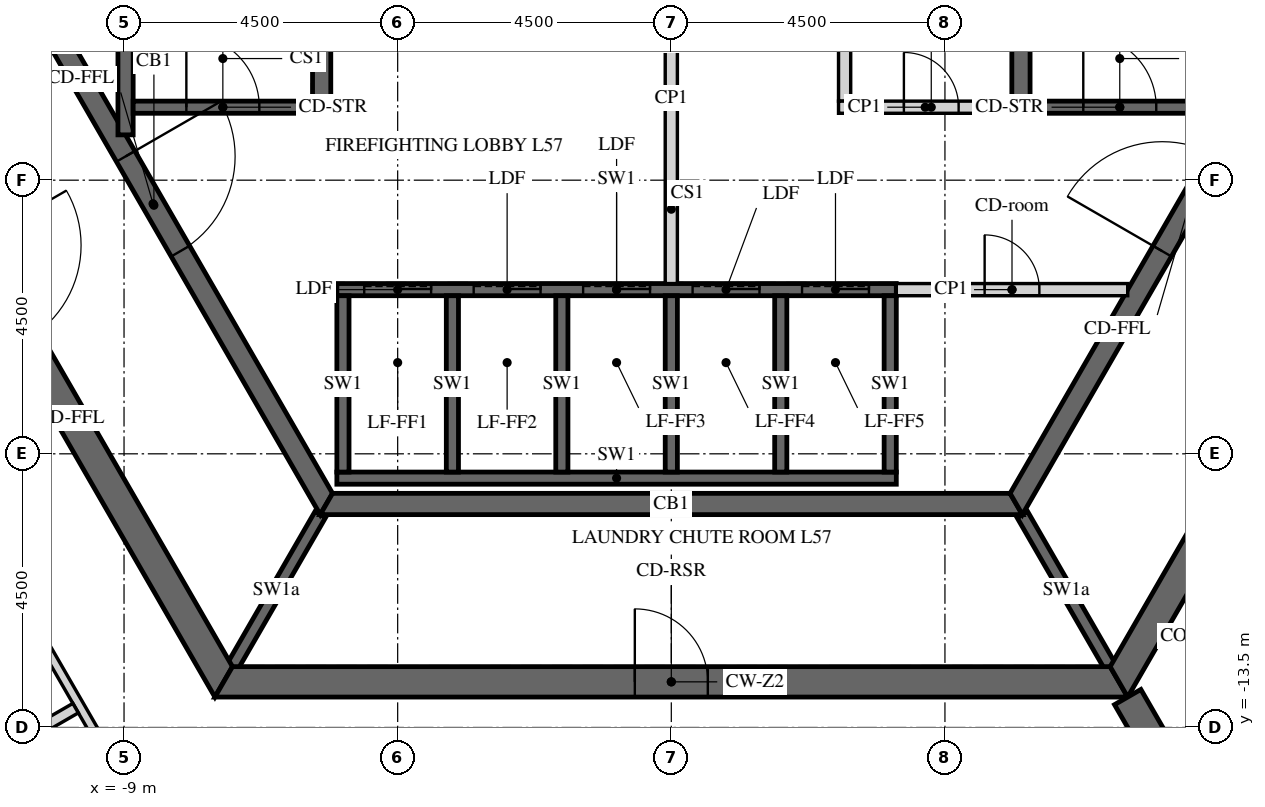
"""IFC4 building model, lengths in metres.
Left out: names, types, materials, properties, quantities, classifications, styles, units other than length and angle.
Written with IfcOpenShell. Run it as: python <this file> out.ifc"""

import sys

from ifc_helpers import new_model, si_unit, direction, frame, frame_2d, origin, place, context, subcontext, project, spatial, polyline, rectangle, outline, extrude, element, fill, save


model = new_model("IFC4")
c1 = context("Model", 3, precision=1e-05, world=origin(), true_north=direction((0.0, 1.0)))
c2 = subcontext(c1, "Body", "Model", "MODEL_VIEW")
j1 = project(units=[si_unit("LENGTHUNIT", "METRE"), si_unit("PLANEANGLEUNIT", "RADIAN")], contexts=[c1])
p1 = place(None, origin())
s1 = spatial("IfcSite", under=j1, at=p1, CompositionType="ELEMENT")
p2 = place(p1, origin())
s2 = spatial("IfcBuilding", under=s1, at=p2, CompositionType="ELEMENT")
p3 = place(p2, frame((0.0, 0.0, 238.5)))
s3 = spatial("IfcBuildingStorey", under=s2, at=p3, CompositionType="ELEMENT", Elevation=238.5)
p4 = place(p3, frame((-14.722, 0.0, -0.15), z_axis=(0.0, 0.0, 1.0), x_axis=(0.50000571537, -0.866022103989, 0.0)))
e1 = element("IfcWall", 1, at=p4, inside=s3, PredefinedType="SHEAR", context=c2, shape_type="SweptSolid", body=[
    extrude(outline(polyline([(-0.144, -0.25), (14.867, -0.25), (14.578, 0.25), (0.144, 0.25), (-0.144, -0.25)])), origin(), (0.0, 0.0, 1.0), 3.9),
])
p5 = place(p4, frame((6.432, 0.0, 0.15)))
e2 = element("IfcOpeningElement", 2, at=p5, cuts=e1, PredefinedType="OPENING", context=c2, shape_type="SweptSolid", body=[
    extrude(rectangle(XDim=1.8, YDim=2.4, at=frame_2d((0.9, 1.2))), frame((0.0, 0.26, 0.0), z_axis=(0.0, -1.0, 0.0), x_axis=(1.0, 0.0, 0.0)), (0.0, 0.0, 1.0), 0.52),
])
p6 = place(p3, frame((-7.361, -12.75, -0.15), z_axis=(0.0, 0.0, 1.0), x_axis=(1.0, 0.0, 0.0)))
e3 = element("IfcWall", 3, at=p6, inside=s3, PredefinedType="SHEAR", context=c2, shape_type="SweptSolid", body=[
    extrude(outline(polyline([(-0.144, -0.25), (14.866, -0.25), (14.578, 0.25), (0.144, 0.25), (-0.144, -0.25)])), origin(), (0.0, 0.0, 1.0), 3.9),
])
p7 = place(p6, frame((6.761, 0.0, 0.15)))
e4 = element("IfcOpeningElement", 4, at=p7, cuts=e3, PredefinedType="OPENING", context=c2, shape_type="SweptSolid", body=[
    extrude(rectangle(XDim=1.2, YDim=2.4, at=frame_2d((0.6, 1.2))), frame((0.0, 0.26, 0.0), z_axis=(0.0, -1.0, 0.0), x_axis=(1.0, 0.0, 0.0)), (0.0, 0.0, 1.0), 0.52),
])
p8 = place(p3, frame((7.361, -12.75, -0.15), z_axis=(0.0, 0.0, 1.0), x_axis=(0.50000571537, 0.866022103989, 0.0)))
e5 = element("IfcWall", 5, at=p8, inside=s3, PredefinedType="SHEAR", context=c2, shape_type="SweptSolid", body=[
    extrude(outline(polyline([(-0.144, -0.25), (14.867, -0.25), (14.578, 0.25), (0.144, 0.25), (-0.144, -0.25)])), origin(), (0.0, 0.0, 1.0), 3.9),
])
p9 = place(p8, frame((6.49, 0.0, 0.15)))
e6 = element("IfcOpeningElement", 6, at=p9, cuts=e5, PredefinedType="OPENING", context=c2, shape_type="SweptSolid", body=[
    extrude(rectangle(XDim=1.8, YDim=2.4, at=frame_2d((0.9, 1.2))), frame((0.0, 0.26, 0.0), z_axis=(0.0, -1.0, 0.0), x_axis=(1.0, 0.0, 0.0)), (0.0, 0.0, 1.0), 0.52),
])
p10 = place(p3, frame((7.506, -13.0, -0.15), z_axis=(0.0, 0.0, 1.0), x_axis=(0.499988271576, -0.866032175087, 0.0)))
e7 = element("IfcWall", 7, at=p10, inside=s3, PredefinedType="SHEAR", context=c2, shape_type="SweptSolid", body=[
    extrude(rectangle(XDim=15.424, YDim=0.5, at=frame_2d((7.712, 0.0))), origin(), (0.0, 0.0, 1.0), 3.9),
])
p11 = place(p10, frame((6.812, 0.0, 0.15)))
e8 = element("IfcOpeningElement", 8, at=p11, cuts=e7, PredefinedType="OPENING", context=c2, shape_type="SweptSolid", body=[
    extrude(rectangle(XDim=1.8, YDim=2.4, at=frame_2d((0.9, 1.2))), frame((0.0, 0.26, 0.0), z_axis=(0.0, -1.0, 0.0), x_axis=(1.0, 0.0, 0.0)), (0.0, 0.0, 1.0), 0.52),
])
p12 = place(p3, frame((-11.345, 0.0, -0.15), z_axis=(0.0, 0.0, 1.0), x_axis=(0.499995046907, -0.866028263435, 0.0)))
e9 = element("IfcWall", 9, at=p12, inside=s3, PredefinedType="SHEAR", context=c2, shape_type="SweptSolid", body=[
    extrude(outline(polyline([(-0.101, -0.175), (11.446, -0.175), (11.244, 0.175), (0.101, 0.175), (-0.101, -0.175)])), origin(), (0.0, 0.0, 1.0), 3.9),
])
p13 = place(p12, frame((4.744, 0.0, 0.15)))
e10 = element("IfcOpeningElement", 10, at=p13, cuts=e9, PredefinedType="OPENING", context=c2, shape_type="SweptSolid", body=[
    extrude(rectangle(XDim=1.8, YDim=2.4, at=frame_2d((0.9, 1.2))), frame((0.0, 0.185, 0.0), z_axis=(0.0, -1.0, 0.0), x_axis=(1.0, 0.0, 0.0)), (0.0, 0.0, 1.0), 0.37),
])
p14 = place(p3, frame((-5.673, -9.825, -0.15), z_axis=(0.0, 0.0, 1.0), x_axis=(1.0, 0.0, 0.0)))
e11 = element("IfcWall", 11, at=p14, inside=s3, PredefinedType="SHEAR", context=c2, shape_type="SweptSolid", body=[
    extrude(outline(polyline([(-0.101, -0.175), (11.446, -0.175), (11.244, 0.175), (0.101, 0.175), (-0.101, -0.175)])), origin(), (0.0, 0.0, 1.0), 3.9),
])
p15 = place(p3, frame((5.673, -9.825, -0.15), z_axis=(0.0, 0.0, 1.0), x_axis=(0.499995046907, 0.866028263435, 0.0)))
e12 = element("IfcWall", 12, at=p15, inside=s3, PredefinedType="SHEAR", context=c2, shape_type="SweptSolid", body=[
    extrude(outline(polyline([(-0.101, -0.175), (11.446, -0.175), (11.244, 0.175), (0.101, 0.175), (-0.101, -0.175)])), origin(), (0.0, 0.0, 1.0), 3.9),
])
p16 = place(p15, frame((4.801, 0.0, 0.15)))
e13 = element("IfcOpeningElement", 13, at=p16, cuts=e12, PredefinedType="OPENING", context=c2, shape_type="SweptSolid", body=[
    extrude(rectangle(XDim=1.8, YDim=2.4, at=frame_2d((0.9, 1.2))), frame((0.0, 0.185, 0.0), z_axis=(0.0, -1.0, 0.0), x_axis=(1.0, 0.0, 0.0)), (0.0, 0.0, 1.0), 0.37),
])
p17 = place(p3, frame((-5.5, -6.3, -0.25), z_axis=(0.0, 0.0, 1.0), x_axis=(1.0, 0.0, 0.0)))
e14 = element("IfcWall", 14, at=p17, inside=s3, PredefinedType="SHEAR", context=c2, shape_type="SweptSolid", body=[
    extrude(rectangle(XDim=9.2, YDim=0.2, at=frame_2d((4.6, 0.0))), origin(), (0.0, 0.0, 1.0), 3.9),
])
p18 = place(p17, frame((0.45, 0.0, 0.25)))
e15 = element("IfcOpeningElement", 15, at=p18, cuts=e14, PredefinedType="OPENING", context=c2, shape_type="SweptSolid", body=[
    extrude(rectangle(XDim=1.1, YDim=2.1, at=frame_2d((0.55, 1.05))), frame((0.0, 0.11, 0.0), z_axis=(0.0, -1.0, 0.0), x_axis=(1.0, 0.0, 0.0)), (0.0, 0.0, 1.0), 0.22),
])
p19 = place(p17, frame((2.25, 0.0, 0.25)))
e16 = element("IfcOpeningElement", 16, at=p19, cuts=e14, PredefinedType="OPENING", context=c2, shape_type="SweptSolid", body=[
    extrude(rectangle(XDim=1.1, YDim=2.1, at=frame_2d((0.55, 1.05))), frame((0.0, 0.11, 0.0), z_axis=(0.0, -1.0, 0.0), x_axis=(1.0, 0.0, 0.0)), (0.0, 0.0, 1.0), 0.22),
])
p20 = place(p17, frame((4.05, 0.0, 0.25)))
e17 = element("IfcOpeningElement", 17, at=p20, cuts=e14, PredefinedType="OPENING", context=c2, shape_type="SweptSolid", body=[
    extrude(rectangle(XDim=1.1, YDim=2.1, at=frame_2d((0.55, 1.05))), frame((0.0, 0.11, 0.0), z_axis=(0.0, -1.0, 0.0), x_axis=(1.0, 0.0, 0.0)), (0.0, 0.0, 1.0), 0.22),
])
p21 = place(p17, frame((5.85, 0.0, 0.25)))
e18 = element("IfcOpeningElement", 18, at=p21, cuts=e14, PredefinedType="OPENING", context=c2, shape_type="SweptSolid", body=[
    extrude(rectangle(XDim=1.1, YDim=2.1, at=frame_2d((0.55, 1.05))), frame((0.0, 0.11, 0.0), z_axis=(0.0, -1.0, 0.0), x_axis=(1.0, 0.0, 0.0)), (0.0, 0.0, 1.0), 0.22),
])
p22 = place(p17, frame((7.65, 0.0, 0.25)))
e19 = element("IfcOpeningElement", 19, at=p22, cuts=e14, PredefinedType="OPENING", context=c2, shape_type="SweptSolid", body=[
    extrude(rectangle(XDim=1.1, YDim=2.1, at=frame_2d((0.55, 1.05))), frame((0.0, 0.11, 0.0), z_axis=(0.0, -1.0, 0.0), x_axis=(1.0, 0.0, 0.0)), (0.0, 0.0, 1.0), 0.22),
])
p23 = place(p3, frame((-5.5, -9.4, -0.25), z_axis=(0.0, 0.0, 1.0), x_axis=(1.0, 0.0, 0.0)))
e20 = element("IfcWall", 20, at=p23, inside=s3, PredefinedType="SHEAR", context=c2, shape_type="SweptSolid", body=[
    extrude(rectangle(XDim=9.2, YDim=0.2, at=frame_2d((4.6, 0.0))), origin(), (0.0, 0.0, 1.0), 3.9),
])
for number, where, z_axis, x_axis in (
    (21, (-5.4, -9.3, -0.25), (0.0, 0.0, 1.0), (0.0, 1.0, 0.0)),
    (22, (-3.6, -9.3, -0.25), (0.0, 0.0, 1.0), (0.0, 1.0, 0.0)),
    (23, (-1.8, -9.3, -0.25), (0.0, 0.0, 1.0), (0.0, 1.0, 0.0)),
    (24, (0.0, -9.3, -0.25), (0.0, 0.0, 1.0), (0.0, 1.0, 0.0)),
    (25, (1.8, -9.3, -0.25), (0.0, 0.0, 1.0), (0.0, 1.0, 0.0)),
    (26, (3.6, -9.3, -0.25), (0.0, 0.0, 1.0), (0.0, 1.0, 0.0)),
):
    element("IfcWall", number, at=place(p3, frame(where, z_axis=z_axis, x_axis=x_axis)), inside=s3, PredefinedType="SHEAR", context=c2, shape_type="SweptSolid", body=[
        extrude(rectangle(XDim=2.9, YDim=0.2, at=frame_2d((1.45, 0.0))), origin(), (0.0, 0.0, 1.0), 3.9),
    ])
p24 = place(p3, frame((2.75, -3.3, 0.0), z_axis=(0.0, 0.0, 1.0), x_axis=(1.0, 0.0, 0.0)))
e27 = element("IfcWall", 27, at=p24, inside=s3, PredefinedType="PARTITIONING", context=c2, shape_type="SweptSolid", body=[
    extrude(rectangle(XDim=2.85, YDim=0.2, at=frame_2d((1.425, 0.0))), origin(), (0.0, 0.0, 1.0), 3.65),
])
p25 = place(p24, frame((1.075, 0.0, 0.0)))
e28 = element("IfcOpeningElement", 28, at=p25, cuts=e27, PredefinedType="OPENING", context=c2, shape_type="SweptSolid", body=[
    extrude(rectangle(XDim=0.9, YDim=2.1, at=frame_2d((0.45, 1.05))), frame((0.0, 0.11, 0.0), z_axis=(0.0, -1.0, 0.0), x_axis=(1.0, 0.0, 0.0)), (0.0, 0.0, 1.0), 0.22),
])
p26 = place(p3, frame((2.85, -3.2, 0.0), z_axis=(0.0, 0.0, 1.0), x_axis=(0.0, 1.0, 0.0)))
e29 = element("IfcWall", 29, at=p26, inside=s3, PredefinedType="PARTITIONING", context=c2, shape_type="SweptSolid", body=[
    extrude(rectangle(XDim=3.1, YDim=0.2, at=frame_2d((1.55, 0.0))), origin(), (0.0, 0.0, 1.0), 3.65),
])
p27 = place(p3, frame((0.0, -6.2, 0.0), z_axis=(0.0, 0.0, 1.0), x_axis=(0.0, 1.0, 0.0)))
e30 = element("IfcWall", 30, at=p27, inside=s3, PredefinedType="PARTITIONING", context=c2, shape_type="SweptSolid", body=[
    extrude(rectangle(XDim=6.1, YDim=0.2, at=frame_2d((3.05, 0.0))), origin(), (0.0, 0.0, 1.0), 3.65),
])
p28 = place(p3, frame((3.7, -6.3, 0.0), z_axis=(0.0, 0.0, 1.0), x_axis=(1.0, 0.0, 0.0)))
e31 = element("IfcWall", 31, at=p28, inside=s3, PredefinedType="PARTITIONING", context=c2, shape_type="SweptSolid", body=[
    extrude(rectangle(XDim=3.806, YDim=0.2, at=frame_2d((1.903, 0.0))), origin(), (0.0, 0.0, 1.0), 3.65),
])
p29 = place(p28, frame((1.453, 0.0, 0.0)))
e32 = element("IfcOpeningElement", 32, at=p29, cuts=e31, PredefinedType="OPENING", context=c2, shape_type="SweptSolid", body=[
    extrude(rectangle(XDim=0.9, YDim=2.1, at=frame_2d((0.45, 1.05))), frame((0.0, 0.11, 0.0), z_axis=(0.0, -1.0, 0.0), x_axis=(1.0, 0.0, 0.0)), (0.0, 0.0, 1.0), 0.22),
])
for number, where, z_axis, x_axis in (
    (33, (-5.773, -10.0, -0.15), (0.0, 0.0, 1.0), (-0.5, -0.866, 0.0)),
    (34, (5.773, -10.0, -0.15), (0.0, 0.0, 1.0), (0.5, -0.866, 0.0)),
):
    element("IfcWall", number, at=place(p3, frame(where, z_axis=z_axis, x_axis=x_axis)), inside=s3, PredefinedType="SHEAR", context=c2, shape_type="SweptSolid", body=[
        extrude(rectangle(XDim=2.887, YDim=0.2, at=frame_2d((1.443, 0.0))), origin(), (0.0, 0.0, 1.0), 3.9),
    ])
p30 = place(p3, frame((5.75, -3.4, -0.25), z_axis=(0.0, 0.0, 1.0), x_axis=(0.0, 1.0, 0.0)))
e35 = element("IfcWall", 35, at=p30, inside=s3, PredefinedType="SHEAR", context=c2, shape_type="SweptSolid", body=[
    extrude(rectangle(XDim=6.8, YDim=0.3, at=frame_2d((3.4, 0.0))), origin(), (0.0, 0.0, 1.0), 3.9),
])
p31 = place(p3, frame((5.9, -3.3, -0.25), z_axis=(0.0, 0.0, 1.0), x_axis=(1.0, 0.0, 0.0)))
e36 = element("IfcWall", 36, at=p31, inside=s3, PredefinedType="SHEAR", context=c2, shape_type="SweptSolid", body=[
    extrude(rectangle(XDim=2.95, YDim=0.2, at=frame_2d((1.475, 0.0))), origin(), (0.0, 0.0, 1.0), 3.9),
])
p32 = place(p31, frame((0.875, 0.0, 0.25)))
e37 = element("IfcOpeningElement", 37, at=p32, cuts=e36, PredefinedType="OPENING", context=c2, shape_type="SweptSolid", body=[
    extrude(rectangle(XDim=1.2, YDim=2.4, at=frame_2d((0.6, 1.2))), frame((0.0, 0.11, 0.0), z_axis=(0.0, -1.0, 0.0), x_axis=(1.0, 0.0, 0.0)), (0.0, 0.0, 1.0), 0.22),
])
p33 = place(p3, frame((-5.75, -3.4, -0.25), z_axis=(0.0, 0.0, 1.0), x_axis=(0.0, 1.0, 0.0)))
e38 = element("IfcWall", 38, at=p33, inside=s3, PredefinedType="SHEAR", context=c2, shape_type="SweptSolid", body=[
    extrude(rectangle(XDim=6.8, YDim=0.3, at=frame_2d((3.4, 0.0))), origin(), (0.0, 0.0, 1.0), 3.9),
])
p34 = place(p3, frame((-8.975, -3.755, -0.25), z_axis=(0.0, 0.0, 1.0), x_axis=(0.0, 1.0, 0.0)))
e39 = element("IfcWall", 39, at=p34, inside=s3, PredefinedType="SHEAR", context=c2, shape_type="SweptSolid", body=[
    extrude(rectangle(XDim=7.51, YDim=0.25, at=frame_2d((3.755, 0.0))), origin(), (0.0, 0.0, 1.0), 3.9),
])
p35 = place(p3, frame((-8.85, -3.3, -0.25), z_axis=(0.0, 0.0, 1.0), x_axis=(1.0, 0.0, 0.0)))
e40 = element("IfcWall", 40, at=p35, inside=s3, PredefinedType="SHEAR", context=c2, shape_type="SweptSolid", body=[
    extrude(rectangle(XDim=2.95, YDim=0.2, at=frame_2d((1.475, 0.0))), origin(), (0.0, 0.0, 1.0), 3.9),
])
p36 = place(p35, frame((0.875, 0.0, 0.25)))
e41 = element("IfcOpeningElement", 41, at=p36, cuts=e40, PredefinedType="OPENING", context=c2, shape_type="SweptSolid", body=[
    extrude(rectangle(XDim=1.2, YDim=2.4, at=frame_2d((0.6, 1.2))), frame((0.0, 0.11, 0.0), z_axis=(0.0, -1.0, 0.0), x_axis=(1.0, 0.0, 0.0)), (0.0, 0.0, 1.0), 0.22),
])
p37 = place(p3, frame((-15.094, -3.856, 0.0), z_axis=(0.0, 0.0, 1.0), x_axis=(0.500006037985, -0.866021917724, 0.0)))
e42 = element("IfcWall", 42, at=p37, inside=s3, PredefinedType="PARTITIONING", context=c2, shape_type="SweptSolid", body=[
    extrude(rectangle(XDim=12.867, YDim=0.15, at=frame_2d((6.434, 0.0))), origin(), (0.0, 0.0, 1.0), 2.838),
])
p38 = place(p37, frame((6.125, 0.0, 0.0)))
e43 = element("IfcOpeningElement", 43, at=p38, cuts=e42, PredefinedType="OPENING", context=c2, shape_type="SweptSolid", body=[
    extrude(rectangle(XDim=1.0, YDim=2.1, at=frame_2d((0.5, 1.05))), frame((0.0, 0.085, 0.0), z_axis=(0.0, -1.0, 0.0), x_axis=(1.0, 0.0, 0.0)), (0.0, 0.0, 1.0), 0.17),
])
p39 = place(p3, frame((-20.513, -19.37, 0.0), z_axis=(0.0, 0.0, 1.0), x_axis=(0.866024931941, 0.500000817256, 0.0)))
e44 = element("IfcWall", 44, at=p39, inside=s3, PredefinedType="PARTITIONING", context=c2, shape_type="SweptSolid", body=[
    extrude(rectangle(XDim=12.375, YDim=0.18, at=frame_2d((6.188, 0.0))), origin(), (0.0, 0.0, 1.0), 2.838),
])
p40 = place(p7, origin())
e45 = element("IfcDoor", 45, at=p40, inside=s3, OperationType="SINGLE_SWING_LEFT", PredefinedType="DOOR", context=c2, shape_type="SweptSolid", body=[
    extrude(rectangle(XDim=1.2, YDim=2.4, at=frame_2d((0.6, 1.2))), frame((0.0, 0.025, 0.0), z_axis=(0.0, -1.0, 0.0), x_axis=(1.0, 0.0, 0.0)), (0.0, 0.0, 1.0), 0.05),
])
fill(e4, e45)
p41 = place(p13, origin())
e46 = element("IfcDoor", 46, at=p41, inside=s3, OperationType="DOUBLE_DOOR_SINGLE_SWING", PredefinedType="DOOR", context=c2, shape_type="SweptSolid", body=[
    extrude(rectangle(XDim=1.8, YDim=2.4, at=frame_2d((0.9, 1.2))), frame((0.0, 0.025, 0.0), z_axis=(0.0, -1.0, 0.0), x_axis=(1.0, 0.0, 0.0)), (0.0, 0.0, 1.0), 0.05),
])
fill(e10, e46)
p42 = place(p16, origin())
e47 = element("IfcDoor", 47, at=p42, inside=s3, OperationType="DOUBLE_DOOR_SINGLE_SWING", PredefinedType="DOOR", context=c2, shape_type="SweptSolid", body=[
    extrude(rectangle(XDim=1.8, YDim=2.4, at=frame_2d((0.9, 1.2))), frame((0.0, 0.025, 0.0), z_axis=(0.0, -1.0, 0.0), x_axis=(1.0, 0.0, 0.0)), (0.0, 0.0, 1.0), 0.05),
])
fill(e13, e47)
p43 = place(p25, origin())
e48 = element("IfcDoor", 48, at=p43, inside=s3, OperationType="SINGLE_SWING_LEFT", PredefinedType="DOOR", context=c2, shape_type="SweptSolid", body=[
    extrude(rectangle(XDim=0.9, YDim=2.1, at=frame_2d((0.45, 1.05))), frame((0.0, 0.025, 0.0), z_axis=(0.0, -1.0, 0.0), x_axis=(1.0, 0.0, 0.0)), (0.0, 0.0, 1.0), 0.05),
])
fill(e28, e48)
p44 = place(p29, origin())
e49 = element("IfcDoor", 49, at=p44, inside=s3, OperationType="SINGLE_SWING_LEFT", PredefinedType="DOOR", context=c2, shape_type="SweptSolid", body=[
    extrude(rectangle(XDim=0.9, YDim=2.1, at=frame_2d((0.45, 1.05))), frame((0.0, 0.025, 0.0), z_axis=(0.0, -1.0, 0.0), x_axis=(1.0, 0.0, 0.0)), (0.0, 0.0, 1.0), 0.05),
])
fill(e32, e49)
p45 = place(p32, origin())
e50 = element("IfcDoor", 50, at=p45, inside=s3, OperationType="SINGLE_SWING_LEFT", PredefinedType="DOOR", context=c2, shape_type="SweptSolid", body=[
    extrude(rectangle(XDim=1.2, YDim=2.4, at=frame_2d((0.6, 1.2))), frame((0.0, 0.025, 0.0), z_axis=(0.0, -1.0, 0.0), x_axis=(1.0, 0.0, 0.0)), (0.0, 0.0, 1.0), 0.05),
])
fill(e37, e50)
p46 = place(p36, origin())
e51 = element("IfcDoor", 51, at=p46, inside=s3, OperationType="SINGLE_SWING_LEFT", PredefinedType="DOOR", context=c2, shape_type="SweptSolid", body=[
    extrude(rectangle(XDim=1.2, YDim=2.4, at=frame_2d((0.6, 1.2))), frame((0.0, 0.025, 0.0), z_axis=(0.0, -1.0, 0.0), x_axis=(1.0, 0.0, 0.0)), (0.0, 0.0, 1.0), 0.05),
])
fill(e41, e51)
p47 = place(p18, origin())
e52 = element("IfcDoor", 52, at=p47, inside=s3, OperationType="SLIDING_TO_LEFT", PredefinedType="DOOR", context=c2, shape_type="SweptSolid", body=[
    extrude(rectangle(XDim=1.1, YDim=2.1, at=frame_2d((0.55, 1.05))), frame((0.0, 0.025, 0.0), z_axis=(0.0, -1.0, 0.0), x_axis=(1.0, 0.0, 0.0)), (0.0, 0.0, 1.0), 0.05),
])
fill(e15, e52)
p48 = place(p19, origin())
e53 = element("IfcDoor", 53, at=p48, inside=s3, OperationType="SLIDING_TO_LEFT", PredefinedType="DOOR", context=c2, shape_type="SweptSolid", body=[
    extrude(rectangle(XDim=1.1, YDim=2.1, at=frame_2d((0.55, 1.05))), frame((0.0, 0.025, 0.0), z_axis=(0.0, -1.0, 0.0), x_axis=(1.0, 0.0, 0.0)), (0.0, 0.0, 1.0), 0.05),
])
fill(e16, e53)
p49 = place(p20, origin())
e54 = element("IfcDoor", 54, at=p49, inside=s3, OperationType="SLIDING_TO_LEFT", PredefinedType="DOOR", context=c2, shape_type="SweptSolid", body=[
    extrude(rectangle(XDim=1.1, YDim=2.1, at=frame_2d((0.55, 1.05))), frame((0.0, 0.025, 0.0), z_axis=(0.0, -1.0, 0.0), x_axis=(1.0, 0.0, 0.0)), (0.0, 0.0, 1.0), 0.05),
])
fill(e17, e54)
p50 = place(p21, origin())
e55 = element("IfcDoor", 55, at=p50, inside=s3, OperationType="SLIDING_TO_LEFT", PredefinedType="DOOR", context=c2, shape_type="SweptSolid", body=[
    extrude(rectangle(XDim=1.1, YDim=2.1, at=frame_2d((0.55, 1.05))), frame((0.0, 0.025, 0.0), z_axis=(0.0, -1.0, 0.0), x_axis=(1.0, 0.0, 0.0)), (0.0, 0.0, 1.0), 0.05),
])
fill(e18, e55)
p51 = place(p22, origin())
e56 = element("IfcDoor", 56, at=p51, inside=s3, OperationType="SLIDING_TO_LEFT", PredefinedType="DOOR", context=c2, shape_type="SweptSolid", body=[
    extrude(rectangle(XDim=1.1, YDim=2.1, at=frame_2d((0.55, 1.05))), frame((0.0, 0.025, 0.0), z_axis=(0.0, -1.0, 0.0), x_axis=(1.0, 0.0, 0.0)), (0.0, 0.0, 1.0), 0.05),
])
fill(e19, e56)
save(model, sys.argv[1])
